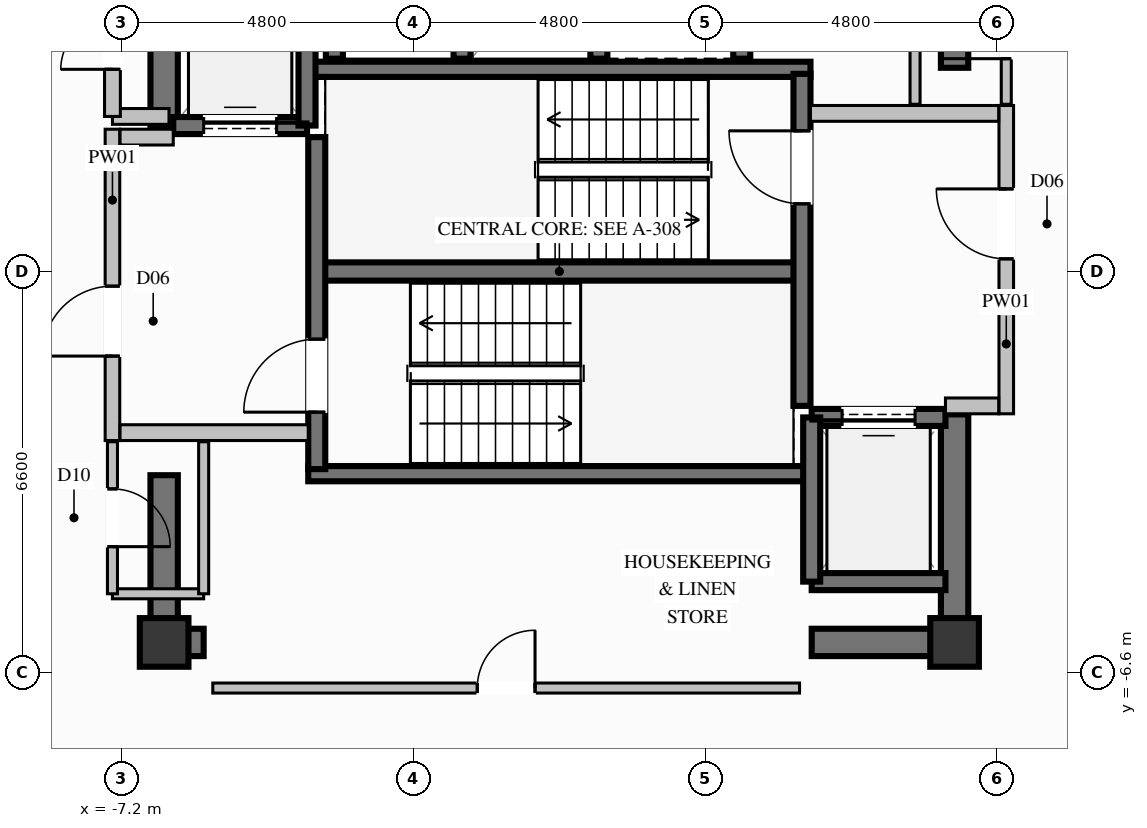
"""IFC4 building model, lengths in metres.
Left out: names, types, materials, properties, quantities, classifications, styles, units other than length and angle.
Written with IfcOpenShell. Run it as: python <this file> out.ifc"""

import sys

from ifc_helpers import new_model, si_unit, direction, frame, frame_2d, origin, origin_2d, place, context, subcontext, project, spatial, rectangle, extrude, element, fill, save


model = new_model("IFC4")
c1 = context("Model", 3, precision=1e-05, world=origin(), true_north=direction((0.0, 1.0)))
c2 = subcontext(c1, "Body", "Model", "MODEL_VIEW")
j1 = project(units=[si_unit("LENGTHUNIT", "METRE"), si_unit("PLANEANGLEUNIT", "RADIAN")], contexts=[c1])
p1 = place(None, origin())
s1 = spatial("IfcSite", under=j1, at=p1, CompositionType="ELEMENT")
p2 = place(p1, origin())
s2 = spatial("IfcBuilding", under=s1, at=p2, CompositionType="ELEMENT")
p3 = place(p2, frame((0.0, 0.0, 293.4)))
s3 = spatial("IfcBuildingStorey", under=s2, at=p3, CompositionType="ELEMENT", Elevation=293.4)
for number, where, z_axis, x_axis in (
    (1, (-6.5, -6.1, 0.0), (0.0, 0.0, 1.0), (1.0, 0.0, 0.0)),
    (2, (6.5, -6.1, 0.0), (0.0, 0.0, 1.0), (1.0, 0.0, 0.0)),
):
    element("IfcColumn", number, at=place(p3, frame(where, z_axis=z_axis, x_axis=x_axis)), inside=s3, PredefinedType="COLUMN", context=c2, shape_type="SweptSolid", body=[
        extrude(rectangle(XDim=0.8, YDim=0.8, at=origin_2d()), origin(), (0.0, 0.0, 1.0), 3.8),
    ])
p4 = place(p3, frame((-3.99, 0.0, 0.0), z_axis=(0.0, 0.0, 1.0), x_axis=(1.0, 0.0, 0.0)))
e3 = element("IfcWall", 3, at=p4, inside=s3, PredefinedType="SHEAR", context=c2, shape_type="SweptSolid", body=[
    extrude(rectangle(XDim=7.98, YDim=0.3, at=frame_2d((3.99, 0.0))), origin(), (0.0, 0.0, 1.0), 3.8),
])
for number, where, z_axis, x_axis in (
    (4, (-4.13, -3.325, 0.0), (0.0, 0.0, 1.0), (1.0, 0.0, 0.0)),
    (5, (-4.13, 3.325, 0.0), (0.0, 0.0, 1.0), (1.0, 0.0, 0.0)),
):
    element("IfcWall", number, at=place(p3, frame(where, z_axis=z_axis, x_axis=x_axis)), inside=s3, PredefinedType="SOLIDWALL", context=c2, shape_type="SweptSolid", body=[
        extrude(rectangle(XDim=8.26, YDim=0.25, at=frame_2d((4.13, 0.0))), origin(), (0.0, 0.0, 1.0), 3.8),
    ])
p5 = place(p3, frame((-6.275, -6.1, 0.0), z_axis=(0.0, 0.0, 1.0), x_axis=(1.0, 0.0, 0.0)))
e6 = element("IfcWall", 6, at=p5, inside=s3, PredefinedType="SHEAR", context=c2, shape_type="SweptSolid", body=[
    extrude(rectangle(XDim=0.425, YDim=0.45, at=frame_2d((0.212, 0.0))), origin(), (0.0, 0.0, 1.0), 3.8),
])
p6 = place(p3, frame((4.15, -6.1, 0.0), z_axis=(0.0, 0.0, 1.0), x_axis=(1.0, 0.0, 0.0)))
e7 = element("IfcWall", 7, at=p6, inside=s3, PredefinedType="SHEAR", context=c2, shape_type="SweptSolid", body=[
    extrude(rectangle(XDim=2.125, YDim=0.45, at=frame_2d((1.062, 0.0))), origin(), (0.0, 0.0, 1.0), 3.8),
])
p7 = place(p3, frame((-6.5, 2.35, 0.0), z_axis=(0.0, 0.0, 1.0), x_axis=(0.0, 1.0, 0.0)))
e8 = element("IfcWall", 8, at=p7, inside=s3, PredefinedType="SHEAR", context=c2, shape_type="SweptSolid", body=[
    extrude(rectangle(XDim=3.975, YDim=0.45, at=frame_2d((1.987, 0.0))), origin(), (0.0, 0.0, 1.0), 3.8),
])
p8 = place(p3, frame((-6.5, -6.325, 0.0), z_axis=(0.0, 0.0, 1.0), x_axis=(0.0, 1.0, 0.0)))
e9 = element("IfcWall", 9, at=p8, inside=s3, PredefinedType="SHEAR", context=c2, shape_type="SweptSolid", body=[
    extrude(rectangle(XDim=2.975, YDim=0.45, at=frame_2d((1.487, 0.0))), origin(), (0.0, 0.0, 1.0), 3.8),
])
p9 = place(p3, frame((6.5, -6.325, 0.0), z_axis=(0.0, 0.0, 1.0), x_axis=(0.0, 1.0, 0.0)))
e10 = element("IfcWall", 10, at=p9, inside=s3, PredefinedType="SHEAR", context=c2, shape_type="SweptSolid", body=[
    extrude(rectangle(XDim=3.975, YDim=0.45, at=frame_2d((1.987, 0.0))), origin(), (0.0, 0.0, 1.0), 3.8),
])
p10 = place(p3, frame((6.5, 3.35, 0.0), z_axis=(0.0, 0.0, 1.0), x_axis=(0.0, 1.0, 0.0)))
e11 = element("IfcWall", 11, at=p10, inside=s3, PredefinedType="SHEAR", context=c2, shape_type="SweptSolid", body=[
    extrude(rectangle(XDim=2.975, YDim=0.45, at=frame_2d((1.487, 0.0))), origin(), (0.0, 0.0, 1.0), 3.8),
])
for number, where, z_axis, x_axis in (
    (12, (-3.7, 6.0, 0.0), (0.0, 0.0, 1.0), (0.0, -1.0, 0.0)),
    (13, (-1.6, 3.5, 0.0), (0.0, 0.0, 1.0), (0.0, 1.0, 0.0)),
    (14, (0.65, 3.5, 0.0), (0.0, 0.0, 1.0), (0.0, 1.0, 0.0)),
    (15, (3.0, 3.5, 0.0), (0.0, 0.0, 1.0), (0.0, 1.0, 0.0)),
):
    element("IfcWall", number, at=place(p3, frame(where, z_axis=z_axis, x_axis=x_axis)), inside=s3, PredefinedType="SOLIDWALL", context=c2, shape_type="SweptSolid", body=[
        extrude(rectangle(XDim=2.5, YDim=0.28, at=frame_2d((1.25, 0.0))), origin(), (0.0, 0.0, 1.0), 3.57),
    ])
p11 = place(p3, frame((-6.35, 2.4, 0.0), z_axis=(0.0, 0.0, 1.0), x_axis=(1.0, 0.0, 0.0)))
e16 = element("IfcWall", 16, at=p11, inside=s3, PredefinedType="SOLIDWALL", context=c2, shape_type="SweptSolid", body=[
    extrude(rectangle(XDim=2.2, YDim=0.28, at=frame_2d((1.1, 0.0))), origin(), (0.0, 0.0, 1.0), 3.57),
])
p12 = place(p11, frame((0.5, 0.0, 0.0)))
e17 = element("IfcOpeningElement", 17, at=p12, cuts=e16, PredefinedType="OPENING", context=c2, shape_type="SweptSolid", body=[
    extrude(rectangle(XDim=1.2, YDim=2.2, at=frame_2d((0.6, 1.1))), frame((0.0, 0.15, 0.0), z_axis=(0.0, -1.0, 0.0), x_axis=(1.0, 0.0, 0.0)), (0.0, 0.0, 1.0), 0.3),
])
p13 = place(p3, frame((-4.15, 2.4, 0.0), z_axis=(0.0, 0.0, 1.0), x_axis=(0.0, 1.0, 0.0)))
e18 = element("IfcWall", 18, at=p13, inside=s3, PredefinedType="SOLIDWALL", context=c2, shape_type="SweptSolid", body=[
    extrude(rectangle(XDim=2.7, YDim=0.28, at=frame_2d((1.35, 0.0))), origin(), (0.0, 0.0, 1.0), 3.57),
])
p14 = place(p3, frame((4.15, -5.1, 0.0), z_axis=(0.0, 0.0, 1.0), x_axis=(1.0, 0.0, 0.0)))
e19 = element("IfcWall", 19, at=p14, inside=s3, PredefinedType="SOLIDWALL", context=c2, shape_type="SweptSolid", body=[
    extrude(rectangle(XDim=2.2, YDim=0.28, at=frame_2d((1.1, 0.0))), origin(), (0.0, 0.0, 1.0), 3.57),
])
p15 = place(p3, frame((6.35, -2.4, 0.0), z_axis=(0.0, 0.0, 1.0), x_axis=(-1.0, 0.0, 0.0)))
e20 = element("IfcWall", 20, at=p15, inside=s3, PredefinedType="SOLIDWALL", context=c2, shape_type="SweptSolid", body=[
    extrude(rectangle(XDim=2.2, YDim=0.28, at=frame_2d((1.1, 0.0))), origin(), (0.0, 0.0, 1.0), 3.57),
])
p16 = place(p15, frame((0.5, 0.0, 0.0)))
e21 = element("IfcOpeningElement", 21, at=p16, cuts=e20, PredefinedType="OPENING", context=c2, shape_type="SweptSolid", body=[
    extrude(rectangle(XDim=1.2, YDim=2.2, at=frame_2d((0.6, 1.1))), frame((0.0, 0.15, 0.0), z_axis=(0.0, -1.0, 0.0), x_axis=(1.0, 0.0, 0.0)), (0.0, 0.0, 1.0), 0.3),
])
p17 = place(p3, frame((4.15, -2.4, 0.0), z_axis=(0.0, 0.0, 1.0), x_axis=(0.0, -1.0, 0.0)))
e22 = element("IfcWall", 22, at=p17, inside=s3, PredefinedType="SOLIDWALL", context=c2, shape_type="SweptSolid", body=[
    extrude(rectangle(XDim=2.7, YDim=0.28, at=frame_2d((1.35, 0.0))), origin(), (0.0, 0.0, 1.0), 3.57),
])
p18 = place(p3, frame((-3.99, -3.25, 0.0), z_axis=(0.0, 0.0, 1.0), x_axis=(0.0, 1.0, 0.0)))
e23 = element("IfcWall", 23, at=p18, inside=s3, PredefinedType="SOLIDWALL", context=c2, shape_type="SweptSolid", body=[
    extrude(rectangle(XDim=5.46, YDim=0.28, at=frame_2d((2.73, 0.0))), origin(), (0.0, 0.0, 1.0), 3.57),
])
p19 = place(p18, frame((0.937, 0.0, 0.0)))
e24 = element("IfcOpeningElement", 24, at=p19, cuts=e23, PredefinedType="OPENING", context=c2, shape_type="SweptSolid", body=[
    extrude(rectangle(XDim=1.2, YDim=2.2, at=frame_2d((0.6, 1.1))), frame((0.0, 0.15, 0.0), z_axis=(0.0, -1.0, 0.0), x_axis=(1.0, 0.0, 0.0)), (0.0, 0.0, 1.0), 0.3),
])
p20 = place(p3, frame((3.99, -2.21, 0.0), z_axis=(0.0, 0.0, 1.0), x_axis=(0.0, 1.0, 0.0)))
e25 = element("IfcWall", 25, at=p20, inside=s3, PredefinedType="SOLIDWALL", context=c2, shape_type="SweptSolid", body=[
    extrude(rectangle(XDim=5.46, YDim=0.28, at=frame_2d((2.73, 0.0))), origin(), (0.0, 0.0, 1.0), 3.57),
])
p21 = place(p20, frame((3.323, 0.0, 0.0)))
e26 = element("IfcOpeningElement", 26, at=p21, cuts=e25, PredefinedType="OPENING", context=c2, shape_type="SweptSolid", body=[
    extrude(rectangle(XDim=1.2, YDim=2.2, at=frame_2d((0.6, 1.1))), frame((0.0, 0.15, 0.0), z_axis=(0.0, -1.0, 0.0), x_axis=(1.0, 0.0, 0.0)), (0.0, 0.0, 1.0), 0.3),
])
p22 = place(p3, frame((-7.35, -2.78, 0.0), z_axis=(0.0, 0.0, 1.0), x_axis=(0.0, 1.0, 0.0)))
e27 = element("IfcWall", 27, at=p22, inside=s3, PredefinedType="PARTITIONING", context=c2, shape_type="SweptSolid", body=[
    extrude(rectangle(XDim=5.12, YDim=0.24, at=frame_2d((2.56, 0.0))), origin(), (0.0, 0.0, 1.0), 2.655),
])
p23 = place(p22, frame((1.389, 0.0, 0.0)))
e28 = element("IfcOpeningElement", 28, at=p23, cuts=e27, PredefinedType="OPENING", context=c2, shape_type="SweptSolid", body=[
    extrude(rectangle(XDim=1.15, YDim=2.2, at=frame_2d((0.575, 1.1))), frame((0.0, 0.13, 0.0), z_axis=(0.0, -1.0, 0.0), x_axis=(1.0, 0.0, 0.0)), (0.0, 0.0, 1.0), 0.26),
])
p24 = place(p3, frame((-7.225, -2.65, 0.0), z_axis=(0.0, 0.0, 1.0), x_axis=(1.0, 0.0, 0.0)))
e29 = element("IfcWall", 29, at=p24, inside=s3, PredefinedType="PARTITIONING", context=c2, shape_type="SweptSolid", body=[
    extrude(rectangle(XDim=3.095, YDim=0.26, at=frame_2d((1.548, 0.0))), origin(), (0.0, 0.0, 1.0), 3.57),
])
p25 = place(p3, frame((-7.225, 2.21, 0.0), z_axis=(0.0, 0.0, 1.0), x_axis=(1.0, 0.0, 0.0)))
e30 = element("IfcWall", 30, at=p25, inside=s3, PredefinedType="PARTITIONING", context=c2, shape_type="SweptSolid", body=[
    extrude(rectangle(XDim=0.875, YDim=0.26, at=frame_2d((0.438, 0.0))), origin(), (0.0, 0.0, 1.0), 3.57),
])
p26 = place(p3, frame((7.35, -2.34, 0.0), z_axis=(0.0, 0.0, 1.0), x_axis=(0.0, 1.0, 0.0)))
e31 = element("IfcWall", 31, at=p26, inside=s3, PredefinedType="PARTITIONING", context=c2, shape_type="SweptSolid", body=[
    extrude(rectangle(XDim=5.07, YDim=0.24, at=frame_2d((2.535, 0.0))), origin(), (0.0, 0.0, 1.0), 2.655),
])
p27 = place(p26, frame((2.548, 0.0, 0.0)))
e32 = element("IfcOpeningElement", 32, at=p27, cuts=e31, PredefinedType="OPENING", context=c2, shape_type="SweptSolid", body=[
    extrude(rectangle(XDim=1.15, YDim=2.2, at=frame_2d((0.575, 1.1))), frame((0.0, 0.13, 0.0), z_axis=(0.0, -1.0, 0.0), x_axis=(1.0, 0.0, 0.0)), (0.0, 0.0, 1.0), 0.26),
])
p28 = place(p3, frame((6.35, -2.21, 0.0), z_axis=(0.0, 0.0, 1.0), x_axis=(1.0, 0.0, 0.0)))
e33 = element("IfcWall", 33, at=p28, inside=s3, PredefinedType="PARTITIONING", context=c2, shape_type="SweptSolid", body=[
    extrude(rectangle(XDim=0.875, YDim=0.26, at=frame_2d((0.438, 0.0))), origin(), (0.0, 0.0, 1.0), 3.57),
])
p29 = place(p3, frame((4.13, 2.6, 0.0), z_axis=(0.0, 0.0, 1.0), x_axis=(1.0, 0.0, 0.0)))
e34 = element("IfcWall", 34, at=p29, inside=s3, PredefinedType="PARTITIONING", context=c2, shape_type="SweptSolid", body=[
    extrude(rectangle(XDim=3.095, YDim=0.26, at=frame_2d((1.548, 0.0))), origin(), (0.0, 0.0, 1.0), 3.57),
])
p30 = place(p3, frame((-7.35, 2.55, 0.0), z_axis=(0.0, 0.0, 1.0), x_axis=(1.0, 0.0, 0.0)))
e35 = element("IfcWall", 35, at=p30, inside=s3, PredefinedType="PARTITIONING", context=c2, shape_type="SweptSolid", body=[
    extrude(rectangle(XDim=0.93, YDim=0.26, at=frame_2d((0.465, 0.0))), origin(), (0.0, 0.0, 1.0), 3.57),
])
p31 = place(p3, frame((-7.35, 2.55, 0.0), z_axis=(0.0, 0.0, 1.0), x_axis=(0.0, 1.0, 0.0)))
e36 = element("IfcWall", 36, at=p31, inside=s3, PredefinedType="PARTITIONING", context=c2, shape_type="SweptSolid", body=[
    extrude(rectangle(XDim=2.4, YDim=0.26, at=frame_2d((1.2, 0.0))), origin(), (0.0, 0.0, 1.0), 2.655),
])
p32 = place(p31, frame((0.775, 0.0, 0.0)))
e37 = element("IfcOpeningElement", 37, at=p32, cuts=e36, PredefinedType="OPENING", context=c2, shape_type="SweptSolid", body=[
    extrude(rectangle(XDim=0.85, YDim=2.05, at=frame_2d((0.425, 1.025))), frame((0.0, 0.14, 0.0), z_axis=(0.0, -1.0, 0.0), x_axis=(1.0, 0.0, 0.0)), (0.0, 0.0, 1.0), 0.28),
])
p33 = place(p3, frame((-7.35, -5.3, 0.0), z_axis=(0.0, 0.0, 1.0), x_axis=(1.0, 0.0, 0.0)))
e38 = element("IfcWall", 38, at=p33, inside=s3, PredefinedType="PARTITIONING", context=c2, shape_type="SweptSolid", body=[
    extrude(rectangle(XDim=1.5, YDim=0.165, at=frame_2d((0.75, 0.0))), origin(), (0.0, 0.0, 1.0), 2.655),
])
p34 = place(p3, frame((-5.85, -5.3, 0.0), z_axis=(0.0, 0.0, 1.0), x_axis=(0.0, 1.0, 0.0)))
e39 = element("IfcWall", 39, at=p34, inside=s3, PredefinedType="PARTITIONING", context=c2, shape_type="SweptSolid", body=[
    extrude(rectangle(XDim=2.5, YDim=0.165, at=frame_2d((1.25, 0.0))), origin(), (0.0, 0.0, 1.0), 2.655),
])
p35 = place(p3, frame((-7.35, -2.8, 0.0), z_axis=(0.0, 0.0, 1.0), x_axis=(0.0, -1.0, 0.0)))
e40 = element("IfcWall", 40, at=p35, inside=s3, PredefinedType="PARTITIONING", context=c2, shape_type="SweptSolid", body=[
    extrude(rectangle(XDim=2.5, YDim=0.165, at=frame_2d((1.25, 0.0))), origin(), (0.0, 0.0, 1.0), 3.57),
])
p36 = place(p35, frame((0.775, 0.0, 0.0)))
e41 = element("IfcOpeningElement", 41, at=p36, cuts=e40, PredefinedType="OPENING", context=c2, shape_type="SweptSolid", body=[
    extrude(rectangle(XDim=0.95, YDim=2.1, at=frame_2d((0.475, 1.05))), frame((0.0, 0.093, 0.0), z_axis=(0.0, -1.0, 0.0), x_axis=(1.0, 0.0, 0.0)), (0.0, 0.0, 1.0), 0.185),
])
p37 = place(p3, frame((7.35, 2.75, 0.0), z_axis=(0.0, 0.0, 1.0), x_axis=(0.0, 1.0, 0.0)))
e42 = element("IfcWall", 42, at=p37, inside=s3, PredefinedType="PARTITIONING", context=c2, shape_type="SweptSolid", body=[
    extrude(rectangle(XDim=2.55, YDim=0.165, at=frame_2d((1.275, 0.0))), origin(), (0.0, 0.0, 1.0), 3.57),
])
p38 = place(p37, frame((0.75, 0.0, 0.0)))
e43 = element("IfcOpeningElement", 43, at=p38, cuts=e42, PredefinedType="OPENING", context=c2, shape_type="SweptSolid", body=[
    extrude(rectangle(XDim=1.05, YDim=2.15, at=frame_2d((0.525, 1.075))), frame((0.0, 0.093, 0.0), z_axis=(0.0, -1.0, 0.0), x_axis=(1.0, 0.0, 0.0)), (0.0, 0.0, 1.0), 0.185),
])
p39 = place(p3, frame((5.85, 5.3, 0.0), z_axis=(0.0, 0.0, 1.0), x_axis=(0.0, -1.0, 0.0)))
e44 = element("IfcWall", 44, at=p39, inside=s3, PredefinedType="PARTITIONING", context=c2, shape_type="SweptSolid", body=[
    extrude(rectangle(XDim=2.55, YDim=0.165, at=frame_2d((1.275, 0.0))), origin(), (0.0, 0.0, 1.0), 2.655),
])
p40 = place(p3, frame((-5.7, -6.85, 0.0), z_axis=(0.0, 0.0, 1.0), x_axis=(1.0, 0.0, 0.0)))
e45 = element("IfcWall", 45, at=p40, inside=s3, PredefinedType="PARTITIONING", context=c2, shape_type="SweptSolid", body=[
    extrude(rectangle(XDim=9.65, YDim=0.165, at=frame_2d((4.825, 0.0))), origin(), (0.0, 0.0, 1.0), 2.655),
])
p41 = place(p40, frame((4.35, 0.0, 0.0)))
e46 = element("IfcOpeningElement", 46, at=p41, cuts=e45, PredefinedType="OPENING", context=c2, shape_type="SweptSolid", body=[
    extrude(rectangle(XDim=0.95, YDim=2.1, at=frame_2d((0.475, 1.05))), frame((0.0, 0.093, 0.0), z_axis=(0.0, -1.0, 0.0), x_axis=(1.0, 0.0, 0.0)), (0.0, 0.0, 1.0), 0.185),
])
p42 = place(p12, origin())
e47 = element("IfcDoor", 47, at=p42, inside=s3, OperationType="SLIDING_TO_LEFT", PredefinedType="DOOR", context=c2, shape_type="SweptSolid", body=[
    extrude(rectangle(XDim=1.2, YDim=2.2, at=frame_2d((0.6, 1.1))), frame((0.0, 0.025, 0.0), z_axis=(0.0, -1.0, 0.0), x_axis=(1.0, 0.0, 0.0)), (0.0, 0.0, 1.0), 0.05),
])
fill(e17, e47)
p43 = place(p16, origin())
e48 = element("IfcDoor", 48, at=p43, inside=s3, OperationType="SLIDING_TO_LEFT", PredefinedType="DOOR", context=c2, shape_type="SweptSolid", body=[
    extrude(rectangle(XDim=1.2, YDim=2.2, at=frame_2d((0.6, 1.1))), frame((0.0, 0.025, 0.0), z_axis=(0.0, -1.0, 0.0), x_axis=(1.0, 0.0, 0.0)), (0.0, 0.0, 1.0), 0.05),
])
fill(e21, e48)
p44 = place(p19, origin())
e49 = element("IfcDoor", 49, at=p44, inside=s3, OperationType="SINGLE_SWING_LEFT", PredefinedType="DOOR", context=c2, shape_type="SweptSolid", body=[
    extrude(rectangle(XDim=1.2, YDim=2.2, at=frame_2d((0.6, 1.1))), frame((0.0, 0.025, 0.0), z_axis=(0.0, -1.0, 0.0), x_axis=(1.0, 0.0, 0.0)), (0.0, 0.0, 1.0), 0.05),
])
fill(e24, e49)
p45 = place(p21, origin())
e50 = element("IfcDoor", 50, at=p45, inside=s3, OperationType="SINGLE_SWING_RIGHT", PredefinedType="DOOR", context=c2, shape_type="SweptSolid", body=[
    extrude(rectangle(XDim=1.2, YDim=2.2, at=frame_2d((0.6, 1.1))), frame((0.0, 0.025, 0.0), z_axis=(0.0, -1.0, 0.0), x_axis=(1.0, 0.0, 0.0)), (0.0, 0.0, 1.0), 0.05),
])
fill(e26, e50)
p46 = place(p23, origin())
e51 = element("IfcDoor", 51, at=p46, inside=s3, OperationType="SINGLE_SWING_LEFT", PredefinedType="DOOR", context=c2, shape_type="SweptSolid", body=[
    extrude(rectangle(XDim=1.15, YDim=2.2, at=frame_2d((0.575, 1.1))), frame((0.0, 0.025, 0.0), z_axis=(0.0, -1.0, 0.0), x_axis=(1.0, 0.0, 0.0)), (0.0, 0.0, 1.0), 0.05),
])
fill(e28, e51)
p47 = place(p27, origin())
e52 = element("IfcDoor", 52, at=p47, inside=s3, OperationType="SINGLE_SWING_RIGHT", PredefinedType="DOOR", context=c2, shape_type="SweptSolid", body=[
    extrude(rectangle(XDim=1.15, YDim=2.2, at=frame_2d((0.575, 1.1))), frame((0.0, 0.025, 0.0), z_axis=(0.0, -1.0, 0.0), x_axis=(1.0, 0.0, 0.0)), (0.0, 0.0, 1.0), 0.05),
])
fill(e32, e52)
p48 = place(p32, origin())
e53 = element("IfcDoor", 53, at=p48, inside=s3, OperationType="SINGLE_SWING_LEFT", PredefinedType="DOOR", context=c2, shape_type="SweptSolid", body=[
    extrude(rectangle(XDim=0.85, YDim=2.05, at=frame_2d((0.425, 1.025))), frame((0.0, 0.025, 0.0), z_axis=(0.0, -1.0, 0.0), x_axis=(1.0, 0.0, 0.0)), (0.0, 0.0, 1.0), 0.05),
])
fill(e37, e53)
p49 = place(p36, origin())
e54 = element("IfcDoor", 54, at=p49, inside=s3, OperationType="SINGLE_SWING_RIGHT", PredefinedType="DOOR", context=c2, shape_type="SweptSolid", body=[
    extrude(rectangle(XDim=0.95, YDim=2.1, at=frame_2d((0.475, 1.05))), frame((0.0, 0.025, 0.0), z_axis=(0.0, -1.0, 0.0), x_axis=(1.0, 0.0, 0.0)), (0.0, 0.0, 1.0), 0.05),
])
fill(e41, e54)
p50 = place(p38, origin())
e55 = element("IfcDoor", 55, at=p50, inside=s3, OperationType="SINGLE_SWING_LEFT", PredefinedType="DOOR", context=c2, shape_type="SweptSolid", body=[
    extrude(rectangle(XDim=1.05, YDim=2.15, at=frame_2d((0.525, 1.075))), frame((0.0, 0.025, 0.0), z_axis=(0.0, -1.0, 0.0), x_axis=(1.0, 0.0, 0.0)), (0.0, 0.0, 1.0), 0.05),
])
fill(e43, e55)
p51 = place(p41, origin())
e56 = element("IfcDoor", 56, at=p51, inside=s3, OperationType="SINGLE_SWING_RIGHT", PredefinedType="DOOR", context=c2, shape_type="SweptSolid", body=[
    extrude(rectangle(XDim=0.95, YDim=2.1, at=frame_2d((0.475, 1.05))), frame((0.0, 0.025, 0.0), z_axis=(0.0, -1.0, 0.0), x_axis=(1.0, 0.0, 0.0)), (0.0, 0.0, 1.0), 0.05),
])
fill(e46, e56)
save(model, sys.argv[1])
